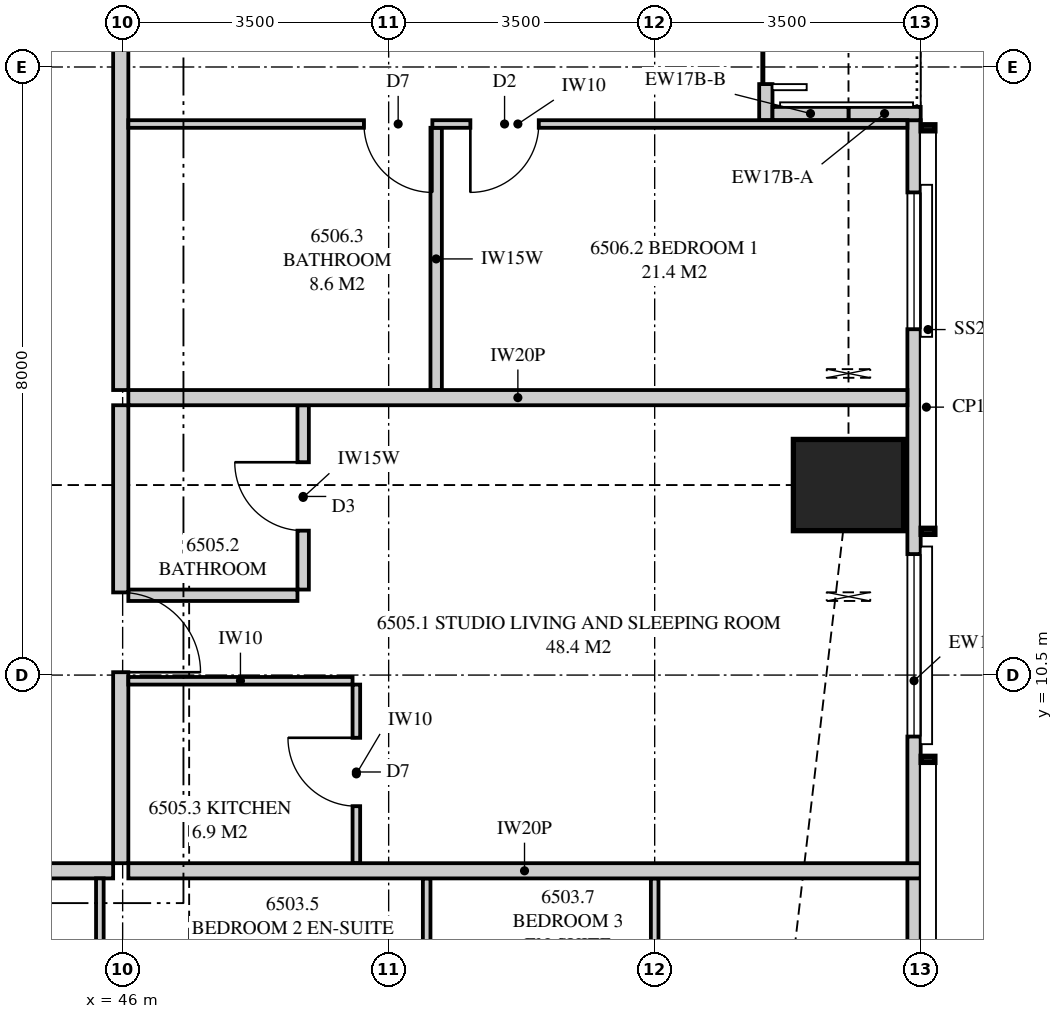
"""IFC4 building model, lengths in metres.
Left out: names, types, materials, properties, quantities, classifications, styles, units other than length and angle.
Written with IfcOpenShell. Run it as: python <this file> out.ifc"""

import sys

from ifc_helpers import new_model, si_unit, direction, frame, frame_2d, origin, origin_2d, place, context, subcontext, project, spatial, polyline, rectangle, outline, extrude, element, fill, save


model = new_model("IFC4")
c1 = context("Model", 3, precision=1e-05, world=origin(), true_north=direction((0.0, 1.0)))
c2 = subcontext(c1, "Body", "Model", "MODEL_VIEW")
j1 = project(units=[si_unit("LENGTHUNIT", "METRE"), si_unit("PLANEANGLEUNIT", "RADIAN")], contexts=[c1])
p1 = place(None, origin())
s1 = spatial("IfcSite", under=j1, at=p1, CompositionType="ELEMENT")
p2 = place(p1, origin())
s2 = spatial("IfcBuilding", under=s1, at=p2, CompositionType="ELEMENT")
p3 = place(p2, frame((0.0, 0.0, 238.95)))
s3 = spatial("IfcBuildingStorey", under=s2, at=p3, CompositionType="ELEMENT", Elevation=238.95)
p4 = place(p3, frame((55.55, 13.0, 0.0), z_axis=(0.0, 0.0, 1.0), x_axis=(1.0, 0.0, 0.0)))
e1 = element("IfcColumn", 1, at=p4, inside=s3, PredefinedType="COLUMN", context=c2, shape_type="SweptSolid", body=[
    extrude(rectangle(XDim=1.45, YDim=1.2, at=origin_2d()), origin(), (0.0, 0.0, 1.0), 3.5),
])
p5 = place(p3, frame((56.413, 3.051, 0.0), z_axis=(0.0, 0.0, 1.0), x_axis=(0.0, 1.0, 0.0)))
e2 = element("IfcWall", 2, at=p5, inside=s3, PredefinedType="SOLIDWALL", context=c2, shape_type="SweptSolid", body=[
    extrude(outline(polyline([(0.0, 0.0), (14.749, 0.0), (14.749, 2.3), (9.949, 2.3), (9.949, 3.26), (9.858, 3.26), (9.858, 2.3), (9.688, 2.3), (9.688, 3.26), (0.0, 3.26), (0.0, 0.0)])), frame((0.0, 0.087, 0.0), z_axis=(0.0, -1.0, 0.0), x_axis=(1.0, 0.0, 0.0)), (0.0, 0.0, 1.0), 0.175),
])
p6 = place(p5, frame((6.64, 0.0, 0.4)))
e3 = element("IfcOpeningElement", 3, at=p6, cuts=e2, PredefinedType="OPENING", context=c2, shape_type="SweptSolid", body=[
    extrude(rectangle(XDim=2.4, YDim=1.85, at=frame_2d((1.2, 0.925))), frame((0.0, 0.097, 0.0), z_axis=(0.0, -1.0, 0.0), x_axis=(1.0, 0.0, 0.0)), (0.0, 0.0, 1.0), 0.195),
])
p7 = place(p5, frame((11.999, 0.0, 0.4)))
e4 = element("IfcOpeningElement", 4, at=p7, cuts=e2, PredefinedType="OPENING", context=c2, shape_type="SweptSolid", body=[
    extrude(rectangle(XDim=1.8, YDim=1.85, at=frame_2d((0.9, 0.925))), frame((0.0, 0.097, 0.0), z_axis=(0.0, -1.0, 0.0), x_axis=(1.0, 0.0, 0.0)), (0.0, 0.0, 1.0), 0.195),
])
p8 = place(p3, frame((54.462, 17.8, 0.0), z_axis=(0.0, 0.0, 1.0), x_axis=(0.0, 1.0, 0.0)))
e5 = element("IfcWall", 5, at=p8, inside=s3, PredefinedType="SOLIDWALL", context=c2, shape_type="SweptSolid", body=[
    extrude(outline(polyline([(0.0, 0.0), (2.75, 0.0), (2.75, 3.26), (2.15, 3.26), (2.15, 2.66), (0.0, 2.66), (0.0, 0.0)])), frame((0.0, 0.087, 0.0), z_axis=(0.0, -1.0, 0.0), x_axis=(1.0, 0.0, 0.0)), (0.0, 0.0, 1.0), 0.175),
])
p9 = place(p8, frame((0.475, 0.0, 0.0)))
e6 = element("IfcOpeningElement", 6, at=p9, cuts=e5, PredefinedType="OPENING", context=c2, shape_type="SweptSolid", body=[
    extrude(rectangle(XDim=1.8, YDim=2.25, at=frame_2d((0.9, 1.125))), frame((0.0, 0.097, 0.0), z_axis=(0.0, -1.0, 0.0), x_axis=(1.0, 0.0, 0.0)), (0.0, 0.0, 1.0), 0.195),
])
p10 = place(p3, frame((56.5, 17.887, 0.0), z_axis=(0.0, 0.0, 1.0), x_axis=(-1.0, 0.0, 0.0)))
e7 = element("IfcWall", 7, at=p10, inside=s3, PredefinedType="SOLIDWALL", context=c2, shape_type="SweptSolid", body=[
    extrude(outline(polyline([(0.0, 0.0), (0.95, 0.0), (0.95, 2.3), (0.15, 2.3), (0.15, 3.26), (0.0, 3.26), (0.0, 0.0)])), frame((0.0, 0.087, 0.0), z_axis=(0.0, -1.0, 0.0), x_axis=(1.0, 0.0, 0.0)), (0.0, 0.0, 1.0), 0.175),
])
p11 = place(p3, frame((55.55, 17.887, 0.0), z_axis=(0.0, 0.0, 1.0), x_axis=(-1.0, 0.0, 0.0)))
e8 = element("IfcWall", 8, at=p11, inside=s3, PredefinedType="SOLIDWALL", context=c2, shape_type="SweptSolid", body=[
    extrude(outline(polyline([(0.0, 0.0), (1.0, 0.0), (1.0, 2.66), (0.8, 2.66), (0.8, 2.3), (0.0, 2.3), (0.0, 0.0)])), frame((0.0, 0.087, 0.0), z_axis=(0.0, -1.0, 0.0), x_axis=(1.0, 0.0, 0.0)), (0.0, 0.0, 1.0), 0.175),
])
p12 = place(p3, frame((36.55, 7.925, 0.0), z_axis=(0.0, 0.0, 1.0), x_axis=(1.0, 0.0, 0.0)))
e9 = element("IfcWall", 9, at=p12, inside=s3, PredefinedType="PARTITIONING", context=c2, shape_type="SweptSolid", body=[
    extrude(outline(polyline([(0.0, 0.0), (9.325, 0.0), (9.325, 3.26), (9.325, 2.66), (9.015, 2.66), (9.015, 3.26), (2.01, 3.26), (2.01, 2.66), (0.0, 2.66), (0.0, 3.26), (0.0, 0.0)])), frame((0.0, 0.1, 0.0), z_axis=(0.0, -1.0, 0.0), x_axis=(1.0, 0.0, 0.0)), (0.0, 0.0, 1.0), 0.2),
])
p13 = place(p12, frame((4.15, 0.0, 0.0)))
e10 = element("IfcOpeningElement", 10, at=p13, cuts=e9, PredefinedType="OPENING", context=c2, shape_type="SweptSolid", body=[
    extrude(rectangle(XDim=1.05, YDim=2.2, at=frame_2d((0.525, 1.1))), frame((0.0, 0.11, 0.0), z_axis=(0.0, -1.0, 0.0), x_axis=(1.0, 0.0, 0.0)), (0.0, 0.0, 1.0), 0.22),
])
p14 = place(p3, frame((45.7, 0.175, 0.0), z_axis=(0.0, 0.0, 1.0), x_axis=(0.0, 1.0, 0.0)))
e11 = element("IfcWall", 11, at=p14, inside=s3, PredefinedType="PARTITIONING", context=c2, shape_type="SweptSolid", body=[
    extrude(outline(polyline([(0.0, 0.0), (7.65, 0.0), (7.65, 3.26), (7.65, 2.66), (1.635, 2.66), (1.635, 2.3), (0.0, 2.3), (0.0, 3.26), (0.0, 0.0)])), frame((0.0, 0.05, 0.0), z_axis=(0.0, -1.0, 0.0), x_axis=(1.0, 0.0, 0.0)), (0.0, 0.0, 1.0), 0.1),
])
p15 = place(p14, frame((3.8, 0.0, 0.0)))
e12 = element("IfcOpeningElement", 12, at=p15, cuts=e11, PredefinedType="OPENING", context=c2, shape_type="SweptSolid", body=[
    extrude(rectangle(XDim=0.9, YDim=2.1, at=frame_2d((0.45, 1.05))), frame((0.0, 0.06, 0.0), z_axis=(0.0, -1.0, 0.0), x_axis=(1.0, 0.0, 0.0)), (0.0, 0.0, 1.0), 0.12),
])
p16 = place(p3, frame((50.0, 0.175, 0.0), z_axis=(0.0, 0.0, 1.0), x_axis=(0.0, 1.0, 0.0)))
e13 = element("IfcWall", 13, at=p16, inside=s3, PredefinedType="PARTITIONING", context=c2, shape_type="SweptSolid", body=[
    extrude(outline(polyline([(0.0, 0.0), (7.65, 0.0), (7.65, 3.26), (2.177, 3.26), (2.177, 2.3), (0.432, 2.3), (0.432, 3.26), (0.0, 3.26), (0.0, 0.0)])), frame((0.0, 0.05, 0.0), z_axis=(0.0, -1.0, 0.0), x_axis=(1.0, 0.0, 0.0)), (0.0, 0.0, 1.0), 0.1),
])
p17 = place(p16, frame((3.8, 0.0, 0.0)))
e14 = element("IfcOpeningElement", 14, at=p17, cuts=e13, PredefinedType="OPENING", context=c2, shape_type="SweptSolid", body=[
    extrude(rectangle(XDim=0.9, YDim=2.1, at=frame_2d((0.45, 1.05))), frame((0.0, 0.06, 0.0), z_axis=(0.0, -1.0, 0.0), x_axis=(1.0, 0.0, 0.0)), (0.0, 0.0, 1.0), 0.12),
])
p18 = place(p3, frame((53.0, 0.175, 0.0), z_axis=(0.0, 0.0, 1.0), x_axis=(0.0, 1.0, 0.0)))
e15 = element("IfcWall", 15, at=p18, inside=s3, PredefinedType="PARTITIONING", context=c2, shape_type="SweptSolid", body=[
    extrude(outline(polyline([(0.0, 0.0), (7.65, 0.0), (7.65, 3.26), (2.685, 3.26), (2.685, 2.3), (0.941, 2.3), (0.941, 3.26), (0.0, 3.26), (0.0, 0.0)])), frame((0.0, 0.05, 0.0), z_axis=(0.0, -1.0, 0.0), x_axis=(1.0, 0.0, 0.0)), (0.0, 0.0, 1.0), 0.1),
])
p19 = place(p18, frame((3.8, 0.0, 0.0)))
e16 = element("IfcOpeningElement", 16, at=p19, cuts=e15, PredefinedType="OPENING", context=c2, shape_type="SweptSolid", body=[
    extrude(rectangle(XDim=0.9, YDim=2.1, at=frame_2d((0.45, 1.05))), frame((0.0, 0.06, 0.0), z_axis=(0.0, -1.0, 0.0), x_axis=(1.0, 0.0, 0.0)), (0.0, 0.0, 1.0), 0.12),
])
p20 = place(p3, frame((46.075, 7.925, 0.0), z_axis=(0.0, 0.0, 1.0), x_axis=(1.0, 0.0, 0.0)))
e17 = element("IfcWall", 17, at=p20, inside=s3, PredefinedType="PARTITIONING", context=c2, shape_type="SweptSolid", body=[
    extrude(outline(polyline([(0.0, 0.0), (10.425, 0.0), (10.425, 3.26), (9.8, 3.26), (9.8, 2.3), (7.968, 2.3), (7.968, 3.26), (2.11, 3.26), (2.11, 2.66), (0.0, 2.66), (0.0, 3.26), (0.0, 0.0)])), frame((0.0, 0.1, 0.0), z_axis=(0.0, -1.0, 0.0), x_axis=(1.0, 0.0, 0.0)), (0.0, 0.0, 1.0), 0.2),
])
p21 = place(p3, frame((56.325, 14.15, 0.0), z_axis=(0.0, 0.0, 1.0), x_axis=(-1.0, 0.0, 0.0)))
e18 = element("IfcWall", 18, at=p21, inside=s3, PredefinedType="PARTITIONING", context=c2, shape_type="SweptSolid", body=[
    extrude(outline(polyline([(0.0, 0.0), (10.25, 0.0), (10.25, 3.26), (10.25, 2.66), (1.685, 2.66), (1.685, 2.3), (0.0, 2.3), (0.0, 3.26), (0.0, 0.0)])), frame((0.0, 0.1, 0.0), z_axis=(0.0, -1.0, 0.0), x_axis=(1.0, 0.0, 0.0)), (0.0, 0.0, 1.0), 0.2),
])
p22 = place(p3, frame((45.975, 8.025, 0.0), z_axis=(0.0, 0.0, 1.0), x_axis=(0.0, 1.0, 0.0)))
e19 = element("IfcWall", 19, at=p22, inside=s3, PredefinedType="PARTITIONING", context=c2, shape_type="SweptSolid", body=[
    extrude(outline(polyline([(0.0, 0.0), (6.025, 0.0), (6.025, 3.26), (6.025, 2.66), (5.085, 2.66), (0.0, 2.66), (0.0, 3.26), (0.0, 0.0)])), frame((0.0, 0.1, 0.0), z_axis=(0.0, -1.0, 0.0), x_axis=(1.0, 0.0, 0.0)), (0.0, 0.0, 1.0), 0.2),
])
p23 = place(p22, frame((2.512, 0.0, 0.0)))
e20 = element("IfcOpeningElement", 20, at=p23, cuts=e19, PredefinedType="OPENING", context=c2, shape_type="SweptSolid", body=[
    extrude(rectangle(XDim=1.05, YDim=2.2, at=frame_2d((0.525, 1.1))), frame((0.0, 0.11, 0.0), z_axis=(0.0, -1.0, 0.0), x_axis=(1.0, 0.0, 0.0)), (0.0, 0.0, 1.0), 0.22),
])
p24 = place(p3, frame((48.375, 11.625, 0.0), z_axis=(0.0, 0.0, 1.0), x_axis=(0.0, 1.0, 0.0)))
e21 = element("IfcWall", 21, at=p24, inside=s3, PredefinedType="PLUMBINGWALL", context=c2, shape_type="SweptSolid", body=[
    extrude(outline(polyline([(0.0, 0.0), (2.425, 0.0), (2.425, 3.26), (2.425, 2.66), (0.09, 2.66), (0.09, 3.26), (0.0, 3.26), (0.0, 0.0)])), frame((0.0, 0.075, 0.0), z_axis=(0.0, -1.0, 0.0), x_axis=(1.0, 0.0, 0.0)), (0.0, 0.0, 1.0), 0.15),
])
p25 = place(p24, frame((0.775, 0.0, 0.0)))
e22 = element("IfcOpeningElement", 22, at=p25, cuts=e21, PredefinedType="OPENING", context=c2, shape_type="SweptSolid", body=[
    extrude(rectangle(XDim=0.9, YDim=2.1, at=frame_2d((0.45, 1.05))), frame((0.0, 0.085, 0.0), z_axis=(0.0, -1.0, 0.0), x_axis=(1.0, 0.0, 0.0)), (0.0, 0.0, 1.0), 0.17),
])
p26 = place(p3, frame((48.3, 11.55, 0.0), z_axis=(0.0, 0.0, 1.0), x_axis=(-1.0, 0.0, 0.0)))
e23 = element("IfcWall", 23, at=p26, inside=s3, PredefinedType="PLUMBINGWALL", context=c2, shape_type="SweptSolid", body=[
    extrude(outline(polyline([(0.0, 0.0), (2.225, 0.0), (2.225, 3.26), (2.225, 2.66), (0.14, 2.66), (0.14, 3.26), (0.0, 3.26), (0.0, 0.0)])), frame((0.0, 0.075, 0.0), z_axis=(0.0, -1.0, 0.0), x_axis=(1.0, 0.0, 0.0)), (0.0, 0.0, 1.0), 0.15),
])
p27 = place(p3, frame((49.075, 8.025, 0.0), z_axis=(0.0, 0.0, 1.0), x_axis=(0.0, 1.0, 0.0)))
e24 = element("IfcWall", 24, at=p27, inside=s3, PredefinedType="PARTITIONING", context=c2, shape_type="SweptSolid", body=[
    extrude(rectangle(XDim=2.35, YDim=0.1, at=frame_2d((1.175, 0.0))), origin(), (0.0, 0.0, 1.0), 3.26),
])
p28 = place(p27, frame((0.75, 0.0, 0.0)))
e25 = element("IfcOpeningElement", 25, at=p28, cuts=e24, PredefinedType="OPENING", context=c2, shape_type="SweptSolid", body=[
    extrude(rectangle(XDim=0.9, YDim=2.1, at=frame_2d((0.45, 1.05))), frame((0.0, 0.06, 0.0), z_axis=(0.0, -1.0, 0.0), x_axis=(1.0, 0.0, 0.0)), (0.0, 0.0, 1.0), 0.12),
])
p29 = place(p3, frame((49.025, 10.425, 0.0), z_axis=(0.0, 0.0, 1.0), x_axis=(-1.0, 0.0, 0.0)))
e26 = element("IfcWall", 26, at=p29, inside=s3, PredefinedType="PARTITIONING", context=c2, shape_type="SweptSolid", body=[
    extrude(outline(polyline([(0.0, 0.0), (2.95, 0.0), (2.95, 3.26), (2.95, 2.66), (0.89, 2.66), (0.89, 3.26), (0.0, 3.26), (0.0, 0.0)])), frame((0.0, 0.05, 0.0), z_axis=(0.0, -1.0, 0.0), x_axis=(1.0, 0.0, 0.0)), (0.0, 0.0, 1.0), 0.1),
])
p30 = place(p3, frame((45.975, 14.25, 0.0), z_axis=(0.0, 0.0, 1.0), x_axis=(0.0, 1.0, 0.0)))
e27 = element("IfcWall", 27, at=p30, inside=s3, PredefinedType="PARTITIONING", context=c2, shape_type="SweptSolid", body=[
    extrude(outline(polyline([(0.0, 0.0), (10.75, 0.0), (10.75, 2.66), (9.44, 2.66), (9.44, 3.26), (5.81, 3.26), (5.81, 2.66), (3.19, 2.66), (3.19, 3.26), (0.06, 3.26), (0.06, 2.66), (0.0, 2.66), (0.0, 0.0)])), frame((0.0, 0.1, 0.0), z_axis=(0.0, -1.0, 0.0), x_axis=(1.0, 0.0, 0.0)), (0.0, 0.0, 1.0), 0.2),
])
p31 = place(p30, frame((6.863, 0.0, 0.0)))
e28 = element("IfcOpeningElement", 28, at=p31, cuts=e27, PredefinedType="OPENING", context=c2, shape_type="SweptSolid", body=[
    extrude(rectangle(XDim=1.05, YDim=2.2, at=frame_2d((0.525, 1.1))), frame((0.0, 0.11, 0.0), z_axis=(0.0, -1.0, 0.0), x_axis=(1.0, 0.0, 0.0)), (0.0, 0.0, 1.0), 0.22),
])
p32 = place(p3, frame((56.325, 17.75, 0.0), z_axis=(0.0, 0.0, 1.0), x_axis=(-1.0, 0.0, 0.0)))
e29 = element("IfcWall", 29, at=p32, inside=s3, PredefinedType="PARTITIONING", context=c2, shape_type="SweptSolid", body=[
    extrude(outline(polyline([(0.0, 0.0), (10.25, 0.0), (10.25, 3.26), (10.25, 2.66), (1.635, 2.66), (1.635, 2.3), (0.0, 2.3), (0.0, 3.26), (0.0, 0.0)])), frame((0.0, 0.05, 0.0), z_axis=(0.0, -1.0, 0.0), x_axis=(1.0, 0.0, 0.0)), (0.0, 0.0, 1.0), 0.1),
])
p33 = place(p32, frame((4.85, 0.0, 0.0)))
e30 = element("IfcOpeningElement", 30, at=p33, cuts=e29, PredefinedType="OPENING", context=c2, shape_type="SweptSolid", body=[
    extrude(rectangle(XDim=0.9, YDim=2.1, at=frame_2d((0.45, 1.05))), frame((0.0, 0.06, 0.0), z_axis=(0.0, -1.0, 0.0), x_axis=(1.0, 0.0, 0.0)), (0.0, 0.0, 1.0), 0.12),
])
p34 = place(p32, frame((6.25, 0.0, 0.0)))
e31 = element("IfcOpeningElement", 31, at=p34, cuts=e29, PredefinedType="OPENING", context=c2, shape_type="SweptSolid", body=[
    extrude(rectangle(XDim=0.9, YDim=2.1, at=frame_2d((0.45, 1.05))), frame((0.0, 0.06, 0.0), z_axis=(0.0, -1.0, 0.0), x_axis=(1.0, 0.0, 0.0)), (0.0, 0.0, 1.0), 0.12),
])
p35 = place(p3, frame((50.125, 14.25, 0.0), z_axis=(0.0, 0.0, 1.0), x_axis=(0.0, 1.0, 0.0)))
e32 = element("IfcWall", 32, at=p35, inside=s3, PredefinedType="PLUMBINGWALL", context=c2, shape_type="SweptSolid", body=[
    extrude(outline(polyline([(0.0, 0.0), (3.45, 0.0), (3.45, 3.26), (3.45, 2.66), (3.215, 2.66), (3.215, 3.26), (0.035, 3.26), (0.035, 2.66), (0.0, 2.66), (0.0, 3.26), (0.0, 0.0)])), frame((0.0, 0.075, 0.0), z_axis=(0.0, -1.0, 0.0), x_axis=(1.0, 0.0, 0.0)), (0.0, 0.0, 1.0), 0.15),
])
p36 = place(p6, origin())
e33 = element("IfcWindow", 33, at=p36, inside=s3, PartitioningType="SINGLE_PANEL", PredefinedType="WINDOW", context=c2, shape_type="SweptSolid", body=[
    extrude(rectangle(XDim=2.4, YDim=1.85, at=frame_2d((1.2, 0.925))), frame((0.0, 0.03, 0.0), z_axis=(0.0, -1.0, 0.0), x_axis=(1.0, 0.0, 0.0)), (0.0, 0.0, 1.0), 0.06),
])
fill(e3, e33)
p37 = place(p7, origin())
e34 = element("IfcWindow", 34, at=p37, inside=s3, PartitioningType="SINGLE_PANEL", PredefinedType="WINDOW", context=c2, shape_type="SweptSolid", body=[
    extrude(rectangle(XDim=1.8, YDim=1.85, at=frame_2d((0.9, 0.925))), frame((0.0, 0.03, 0.0), z_axis=(0.0, -1.0, 0.0), x_axis=(1.0, 0.0, 0.0)), (0.0, 0.0, 1.0), 0.06),
])
fill(e4, e34)
p38 = place(p9, origin())
e35 = element("IfcDoor", 35, at=p38, inside=s3, OperationType="SLIDING_TO_LEFT", PredefinedType="DOOR", context=c2, shape_type="SweptSolid", body=[
    extrude(rectangle(XDim=1.8, YDim=2.25, at=frame_2d((0.9, 1.125))), frame((0.0, 0.025, 0.0), z_axis=(0.0, -1.0, 0.0), x_axis=(1.0, 0.0, 0.0)), (0.0, 0.0, 1.0), 0.05),
])
fill(e6, e35)
p39 = place(p23, frame((1.05, 0.0, 0.0), z_axis=(0.0, 0.0, 1.0), x_axis=(-1.0, 0.0, 0.0)))
e36 = element("IfcDoor", 36, at=p39, inside=s3, OperationType="SINGLE_SWING_RIGHT", PredefinedType="DOOR", context=c2, shape_type="SweptSolid", body=[
    extrude(rectangle(XDim=1.05, YDim=2.2, at=frame_2d((0.525, 1.1))), frame((0.0, 0.025, 0.0), z_axis=(0.0, -1.0, 0.0), x_axis=(1.0, 0.0, 0.0)), (0.0, 0.0, 1.0), 0.05),
])
fill(e20, e36)
p40 = place(p25, origin())
e37 = element("IfcDoor", 37, at=p40, inside=s3, OperationType="SINGLE_SWING_RIGHT", PredefinedType="DOOR", context=c2, shape_type="SweptSolid", body=[
    extrude(rectangle(XDim=0.9, YDim=2.1, at=frame_2d((0.45, 1.05))), frame((0.0, 0.025, 0.0), z_axis=(0.0, -1.0, 0.0), x_axis=(1.0, 0.0, 0.0)), (0.0, 0.0, 1.0), 0.05),
])
fill(e22, e37)
p41 = place(p28, origin())
e38 = element("IfcDoor", 38, at=p41, inside=s3, OperationType="SINGLE_SWING_RIGHT", PredefinedType="DOOR", context=c2, shape_type="SweptSolid", body=[
    extrude(rectangle(XDim=0.9, YDim=2.1, at=frame_2d((0.45, 1.05))), frame((0.0, 0.025, 0.0), z_axis=(0.0, -1.0, 0.0), x_axis=(1.0, 0.0, 0.0)), (0.0, 0.0, 1.0), 0.05),
])
fill(e25, e38)
p42 = place(p33, origin())
e39 = element("IfcDoor", 39, at=p42, inside=s3, OperationType="SINGLE_SWING_RIGHT", PredefinedType="DOOR", context=c2, shape_type="SweptSolid", body=[
    extrude(rectangle(XDim=0.9, YDim=2.1, at=frame_2d((0.45, 1.05))), frame((0.0, 0.025, 0.0), z_axis=(0.0, -1.0, 0.0), x_axis=(1.0, 0.0, 0.0)), (0.0, 0.0, 1.0), 0.05),
])
fill(e30, e39)
p43 = place(p34, origin())
e40 = element("IfcDoor", 40, at=p43, inside=s3, OperationType="SINGLE_SWING_LEFT", PredefinedType="DOOR", context=c2, shape_type="SweptSolid", body=[
    extrude(rectangle(XDim=0.9, YDim=2.1, at=frame_2d((0.45, 1.05))), frame((0.0, 0.025, 0.0), z_axis=(0.0, -1.0, 0.0), x_axis=(1.0, 0.0, 0.0)), (0.0, 0.0, 1.0), 0.05),
])
fill(e31, e40)
save(model, sys.argv[1])
